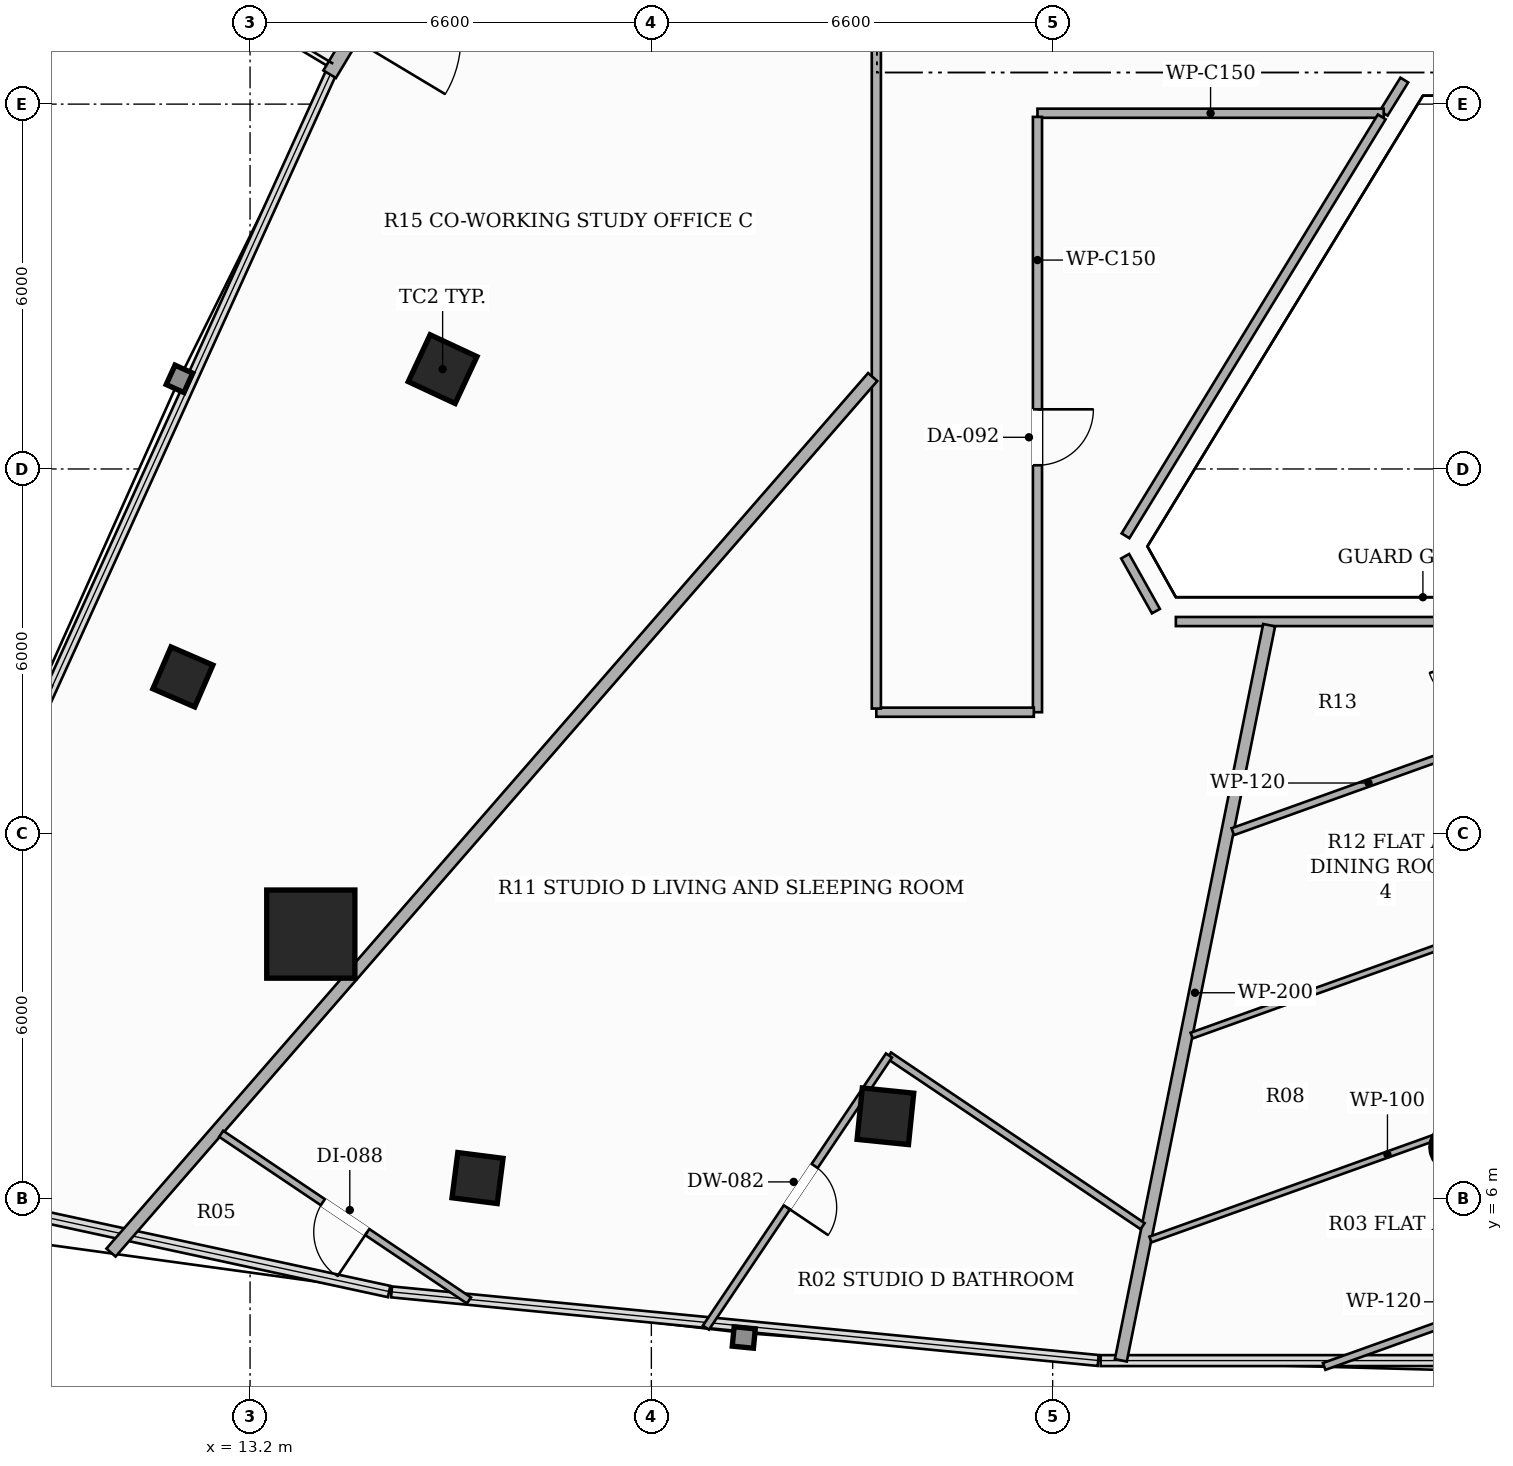
"""IFC4 building model, lengths in metres.
Left out: names, types, materials, properties, quantities, classifications, styles, units other than length and angle.
Written with IfcOpenShell. Run it as: python <this file> out.ifc"""

import sys

from ifc_helpers import new_model, si_unit, direction, frame, frame_2d, origin, origin_2d, place, context, subcontext, project, spatial, rectangle, hollow_rectangle, hollow_circle, extrude, element, fill, save


model = new_model("IFC4")
c1 = context("Model", 3, precision=1e-05, world=origin(), true_north=direction((0.0, 1.0)))
c2 = subcontext(c1, "Body", "Model", "MODEL_VIEW")
j1 = project(units=[si_unit("LENGTHUNIT", "METRE"), si_unit("PLANEANGLEUNIT", "RADIAN")], contexts=[c1])
p1 = place(None, origin())
s1 = spatial("IfcSite", under=j1, at=p1, CompositionType="ELEMENT")
p2 = place(p1, origin())
s2 = spatial("IfcBuilding", under=s1, at=p2, CompositionType="ELEMENT")
p3 = place(p2, frame((0.0, 0.0, 139.7)))
s3 = spatial("IfcBuildingStorey", under=s2, at=p3, CompositionType="ELEMENT", Elevation=139.7)
p4 = place(p3, frame((14.199, 10.351, 0.0), z_axis=(0.0, 0.0, 1.0), x_axis=(1.0, 0.0, 0.0)))
e1 = element("IfcColumn", 1, at=p4, inside=s3, PredefinedType="COLUMN", context=c2, shape_type="SweptSolid", body=[
    extrude(hollow_rectangle(XDim=1.45, YDim=1.45, WallThickness=0.045, at=origin_2d()), origin(), (0.0, 0.0, 1.0), 3.3),
])
for number, where, z_axis, x_axis in (
    (2, (16.367, 19.642, 0.0), (0.0, 0.0, 1.0), (0.423, 0.906, 0.0)),
    (3, (23.649, 7.355, 0.0), (0.0, 0.0, 1.0), (-0.995, 0.101, 0.0)),
):
    element("IfcColumn", number, at=place(p3, frame(where, z_axis=z_axis, x_axis=x_axis)), inside=s3, PredefinedType="COLUMN", context=c2, shape_type="SweptSolid", body=[
        extrude(hollow_rectangle(XDim=0.85, YDim=0.85, WallThickness=0.028, at=origin_2d()), origin(), (0.0, 0.0, 1.0), 3.3),
    ])
p5 = place(p3, frame((33.0, 6.844, 0.0), z_axis=(0.0, 0.0, 1.0), x_axis=(1.0, 0.0, 0.0)))
e4 = element("IfcColumn", 4, at=p5, inside=s3, PredefinedType="COLUMN", context=c2, shape_type="SweptSolid", body=[
    extrude(hollow_circle(Radius=0.381, WallThickness=0.022, at=origin_2d()), origin(), (0.0, 0.0, 1.0), 3.3),
])
for number, where, z_axis, x_axis in (
    (5, (12.095, 14.58, 0.0), (0.0, 0.0, 1.0), (0.397, 0.918, 0.0)),
    (6, (16.941, 6.339, 0.0), (0.0, 0.0, 1.0), (-0.992, 0.127, 0.0)),
):
    element("IfcColumn", number, at=place(p3, frame(where, z_axis=z_axis, x_axis=x_axis)), inside=s3, PredefinedType="COLUMN", context=c2, shape_type="SweptSolid", body=[
        extrude(hollow_rectangle(XDim=0.75, YDim=0.75, WallThickness=0.025, at=origin_2d()), origin(), (0.0, 0.0, 1.0), 3.3),
    ])
p6 = place(p3, frame((20.408, 34.327, 0.0), z_axis=(0.0, 0.0, 1.0), x_axis=(-0.514364263751, -0.857571807009, 0.0)))
e7 = element("IfcWall", 7, at=p6, inside=s3, PredefinedType="SOLIDWALL", context=c2, shape_type="SweptSolid", body=[
    extrude(rectangle(XDim=11.468, YDim=0.24, at=frame_2d((5.734, 0.0))), origin(), (0.0, 0.0, 1.0), 2.624),
])
p7 = place(p6, frame((8.972, 0.0, 0.0)))
e8 = element("IfcOpeningElement", 8, at=p7, cuts=e7, PredefinedType="OPENING", context=c2, shape_type="SweptSolid", body=[
    extrude(rectangle(XDim=1.8, YDim=2.2, at=frame_2d((0.9, 1.1))), frame((0.0, 0.13, 0.0), z_axis=(0.0, -1.0, 0.0), x_axis=(1.0, 0.0, 0.0)), (0.0, 0.0, 1.0), 0.26),
])
p8 = place(p3, frame((32.183, 24.396, 0.0), z_axis=(0.0, 0.0, 1.0), x_axis=(-0.527674894897, -0.849446411079, 0.0)))
e9 = element("IfcWall", 9, at=p8, inside=s3, PredefinedType="PARTITIONING", context=c2, shape_type="SweptSolid", body=[
    extrude(rectangle(XDim=0.643, YDim=0.15, at=frame_2d((0.321, 0.0))), origin(), (0.0, 0.0, 1.0), 3.06),
])
p9 = place(p3, frame((31.844, 23.85, 0.0), z_axis=(0.0, 0.0, 1.0), x_axis=(-1.0, 0.0, 0.0)))
e10 = element("IfcWall", 10, at=p9, inside=s3, PredefinedType="PARTITIONING", context=c2, shape_type="SweptSolid", body=[
    extrude(rectangle(XDim=5.694, YDim=0.15, at=frame_2d((2.847, 0.0))), origin(), (0.0, 0.0, 1.0), 2.721),
])
p10 = place(p3, frame((26.15, 23.79, 0.0), z_axis=(0.0, 0.0, 1.0), x_axis=(0.0, -1.0, 0.0)))
e11 = element("IfcWall", 11, at=p10, inside=s3, PredefinedType="PARTITIONING", context=c2, shape_type="SweptSolid", body=[
    extrude(rectangle(XDim=9.79, YDim=0.15, at=frame_2d((4.895, 0.0))), origin(), (0.0, 0.0, 1.0), 2.721),
])
p11 = place(p10, frame((4.809, 0.0, 0.0)))
e12 = element("IfcOpeningElement", 12, at=p11, cuts=e11, PredefinedType="OPENING", context=c2, shape_type="SweptSolid", body=[
    extrude(rectangle(XDim=0.92, YDim=2.15, at=frame_2d((0.46, 1.075))), frame((0.0, 0.085, 0.0), z_axis=(0.0, -1.0, 0.0), x_axis=(1.0, 0.0, 0.0)), (0.0, 0.0, 1.0), 0.17),
])
p12 = place(p3, frame((26.09, 14.0, 0.0), z_axis=(0.0, 0.0, 1.0), x_axis=(-1.0, 0.0, 0.0)))
e13 = element("IfcWall", 13, at=p12, inside=s3, PredefinedType="PARTITIONING", context=c2, shape_type="SweptSolid", body=[
    extrude(rectangle(XDim=2.59, YDim=0.15, at=frame_2d((1.295, 0.0))), origin(), (0.0, 0.0, 1.0), 2.721),
])
p13 = place(p3, frame((23.5, 14.06, 0.0), z_axis=(0.0, 0.0, 1.0), x_axis=(0.0, 1.0, 0.0)))
e14 = element("IfcWall", 14, at=p13, inside=s3, PredefinedType="PARTITIONING", context=c2, shape_type="SweptSolid", body=[
    extrude(rectangle(XDim=22.84, YDim=0.15, at=frame_2d((11.42, 0.0))), origin(), (0.0, 0.0, 1.0), 2.413),
])
p14 = place(p13, frame((13.533, 0.0, 0.0)))
e15 = element("IfcOpeningElement", 15, at=p14, cuts=e14, PredefinedType="OPENING", context=c2, shape_type="SweptSolid", body=[
    extrude(rectangle(XDim=0.88, YDim=2.1, at=frame_2d((0.44, 1.05))), frame((0.0, 0.085, 0.0), z_axis=(0.0, -1.0, 0.0), x_axis=(1.0, 0.0, 0.0)), (0.0, 0.0, 1.0), 0.17),
])
p15 = place(p3, frame((37.574, 15.491, 0.0), z_axis=(0.0, 0.0, 1.0), x_axis=(-1.0, 0.0, 0.0)))
e16 = element("IfcWall", 16, at=p15, inside=s3, PredefinedType="PARTITIONING", context=c2, shape_type="SweptSolid", body=[
    extrude(rectangle(XDim=9.148, YDim=0.15, at=frame_2d((4.574, 0.0))), origin(), (0.0, 0.0, 1.0), 2.721),
])
p16 = place(p3, frame((28.098, 15.662, 0.0), z_axis=(0.0, 0.0, 1.0), x_axis=(-0.488804496818, 0.872393353878, 0.0)))
e17 = element("IfcWall", 17, at=p16, inside=s3, PredefinedType="PARTITIONING", context=c2, shape_type="SweptSolid", body=[
    extrude(rectangle(XDim=1.035, YDim=0.15, at=frame_2d((0.518, 0.0))), origin(), (0.0, 0.0, 1.0), 3.06),
])
p17 = place(p3, frame((27.598, 16.901, 0.0), z_axis=(0.0, 0.0, 1.0), x_axis=(0.521816809014, 0.853057570057, 0.0)))
e18 = element("IfcWall", 18, at=p17, inside=s3, PredefinedType="PARTITIONING", context=c2, shape_type="SweptSolid", body=[
    extrude(rectangle(XDim=8.076, YDim=0.15, at=frame_2d((4.038, 0.0))), origin(), (0.0, 0.0, 1.0), 2.721),
])
p18 = place(p3, frame((27.521, 3.342, 0.0), z_axis=(0.0, 0.0, 1.0), x_axis=(0.197768112081, 0.980248832615, 0.0)))
e19 = element("IfcWall", 19, at=p18, inside=s3, PredefinedType="PARTITIONING", context=c2, shape_type="SweptSolid", body=[
    extrude(rectangle(XDim=12.333, YDim=0.2, at=frame_2d((6.166, 0.0))), origin(), (0.0, 0.0, 1.0), 2.413),
])
p19 = place(p3, frame((23.44, 19.512, 0.0), z_axis=(0.0, 0.0, 1.0), x_axis=(-0.656359216658, -0.754448526215, 0.0)))
e20 = element("IfcWall", 20, at=p19, inside=s3, PredefinedType="PARTITIONING", context=c2, shape_type="SweptSolid", body=[
    extrude(rectangle(XDim=19.085, YDim=0.2, at=frame_2d((9.543, 0.0))), origin(), (0.0, 0.0, 1.0), 2.413),
])
p20 = place(p3, frame((33.827, 13.636, 0.0), z_axis=(0.0, 0.0, 1.0), x_axis=(-0.941307932725, -0.337549071676, 0.0)))
e21 = element("IfcWall", 21, at=p20, inside=s3, PredefinedType="PARTITIONING", context=c2, shape_type="SweptSolid", body=[
    extrude(rectangle(XDim=4.743, YDim=0.12, at=frame_2d((2.372, 0.0))), origin(), (0.0, 0.0, 1.0), 2.721),
])
p21 = place(p3, frame((30.865, 3.241, 0.0), z_axis=(0.0, 0.0, 1.0), x_axis=(0.941328015911, 0.337493061354, 0.0)))
e22 = element("IfcWall", 22, at=p21, inside=s3, PredefinedType="PARTITIONING", context=c2, shape_type="SweptSolid", body=[
    extrude(rectangle(XDim=6.296, YDim=0.12, at=frame_2d((3.148, 0.0))), origin(), (0.0, 0.0, 1.0), 2.619),
])
p22 = place(p3, frame((28.008, 5.328, 0.0), z_axis=(0.0, 0.0, 1.0), x_axis=(0.941323677897, 0.337505160599, 0.0)))
e23 = element("IfcWall", 23, at=p22, inside=s3, PredefinedType="PARTITIONING", context=c2, shape_type="SweptSolid", body=[
    extrude(rectangle(XDim=8.282, YDim=0.1, at=frame_2d((4.141, 0.0))), origin(), (0.0, 0.0, 1.0), 2.413),
])
p23 = place(p3, frame((28.685, 8.682, 0.0), z_axis=(0.0, 0.0, 1.0), x_axis=(0.94133243901, 0.337480724291, 0.0)))
e24 = element("IfcWall", 24, at=p23, inside=s3, PredefinedType="PARTITIONING", context=c2, shape_type="SweptSolid", body=[
    extrude(rectangle(XDim=6.513, YDim=0.1, at=frame_2d((3.256, 0.0))), origin(), (0.0, 0.0, 1.0), 2.721),
])
p24 = place(p3, frame((27.879, 5.548, 0.0), z_axis=(0.0, 0.0, 1.0), x_axis=(-0.829629274352, 0.558314666777, 0.0)))
e25 = element("IfcWall", 25, at=p24, inside=s3, PredefinedType="PARTITIONING", context=c2, shape_type="SweptSolid", body=[
    extrude(rectangle(XDim=5.027, YDim=0.12, at=frame_2d((2.514, 0.0))), origin(), (0.0, 0.0, 1.0), 2.413),
])
p25 = place(p3, frame((23.708, 8.355, 0.0), z_axis=(0.0, 0.0, 1.0), x_axis=(-0.55815233332, -0.829738496642, 0.0)))
e26 = element("IfcWall", 26, at=p25, inside=s3, PredefinedType="PARTITIONING", context=c2, shape_type="SweptSolid", body=[
    extrude(rectangle(XDim=5.395, YDim=0.12, at=frame_2d((2.697, 0.0))), origin(), (0.0, 0.0, 1.0), 2.413),
])
p26 = place(p25, frame((2.19, 0.0, 0.0)))
e27 = element("IfcOpeningElement", 27, at=p26, cuts=e26, PredefinedType="OPENING", context=c2, shape_type="SweptSolid", body=[
    extrude(rectangle(XDim=0.82, YDim=2.1, at=frame_2d((0.41, 1.05))), frame((0.0, 0.07, 0.0), z_axis=(0.0, -1.0, 0.0), x_axis=(1.0, 0.0, 0.0)), (0.0, 0.0, 1.0), 0.14),
])
p27 = place(p3, frame((16.8, 4.326, 0.0), z_axis=(0.0, 0.0, 1.0), x_axis=(-0.829756434678, 0.558125666056, 0.0)))
e28 = element("IfcWall", 28, at=p27, inside=s3, PredefinedType="PARTITIONING", context=c2, shape_type="SweptSolid", body=[
    extrude(rectangle(XDim=4.911, YDim=0.12, at=frame_2d((2.456, 0.0))), origin(), (0.0, 0.0, 1.0), 3.06),
])
p28 = place(p27, frame((2.016, 0.0, 0.0)))
e29 = element("IfcOpeningElement", 29, at=p28, cuts=e28, PredefinedType="OPENING", context=c2, shape_type="SweptSolid", body=[
    extrude(rectangle(XDim=0.88, YDim=2.1, at=frame_2d((0.44, 1.05))), frame((0.0, 0.07, 0.0), z_axis=(0.0, -1.0, 0.0), x_axis=(1.0, 0.0, 0.0)), (0.0, 0.0, 1.0), 0.14),
])
p29 = place(p11, origin())
e30 = element("IfcDoor", 30, at=p29, inside=s3, OperationType="SINGLE_SWING_LEFT", PredefinedType="DOOR", context=c2, shape_type="SweptSolid", body=[
    extrude(rectangle(XDim=0.92, YDim=2.15, at=frame_2d((0.46, 1.075))), frame((0.0, 0.025, 0.0), z_axis=(0.0, -1.0, 0.0), x_axis=(1.0, 0.0, 0.0)), (0.0, 0.0, 1.0), 0.05),
])
fill(e12, e30)
p30 = place(p26, origin())
e31 = element("IfcDoor", 31, at=p30, inside=s3, OperationType="SINGLE_SWING_RIGHT", PredefinedType="DOOR", context=c2, shape_type="SweptSolid", body=[
    extrude(rectangle(XDim=0.82, YDim=2.1, at=frame_2d((0.41, 1.05))), frame((0.0, 0.025, 0.0), z_axis=(0.0, -1.0, 0.0), x_axis=(1.0, 0.0, 0.0)), (0.0, 0.0, 1.0), 0.05),
])
fill(e27, e31)
p31 = place(p28, origin())
e32 = element("IfcDoor", 32, at=p31, inside=s3, OperationType="SINGLE_SWING_LEFT", PredefinedType="DOOR", context=c2, shape_type="SweptSolid", body=[
    extrude(rectangle(XDim=0.88, YDim=2.1, at=frame_2d((0.44, 1.05))), frame((0.0, 0.025, 0.0), z_axis=(0.0, -1.0, 0.0), x_axis=(1.0, 0.0, 0.0)), (0.0, 0.0, 1.0), 0.05),
])
fill(e29, e32)
save(model, sys.argv[1])
